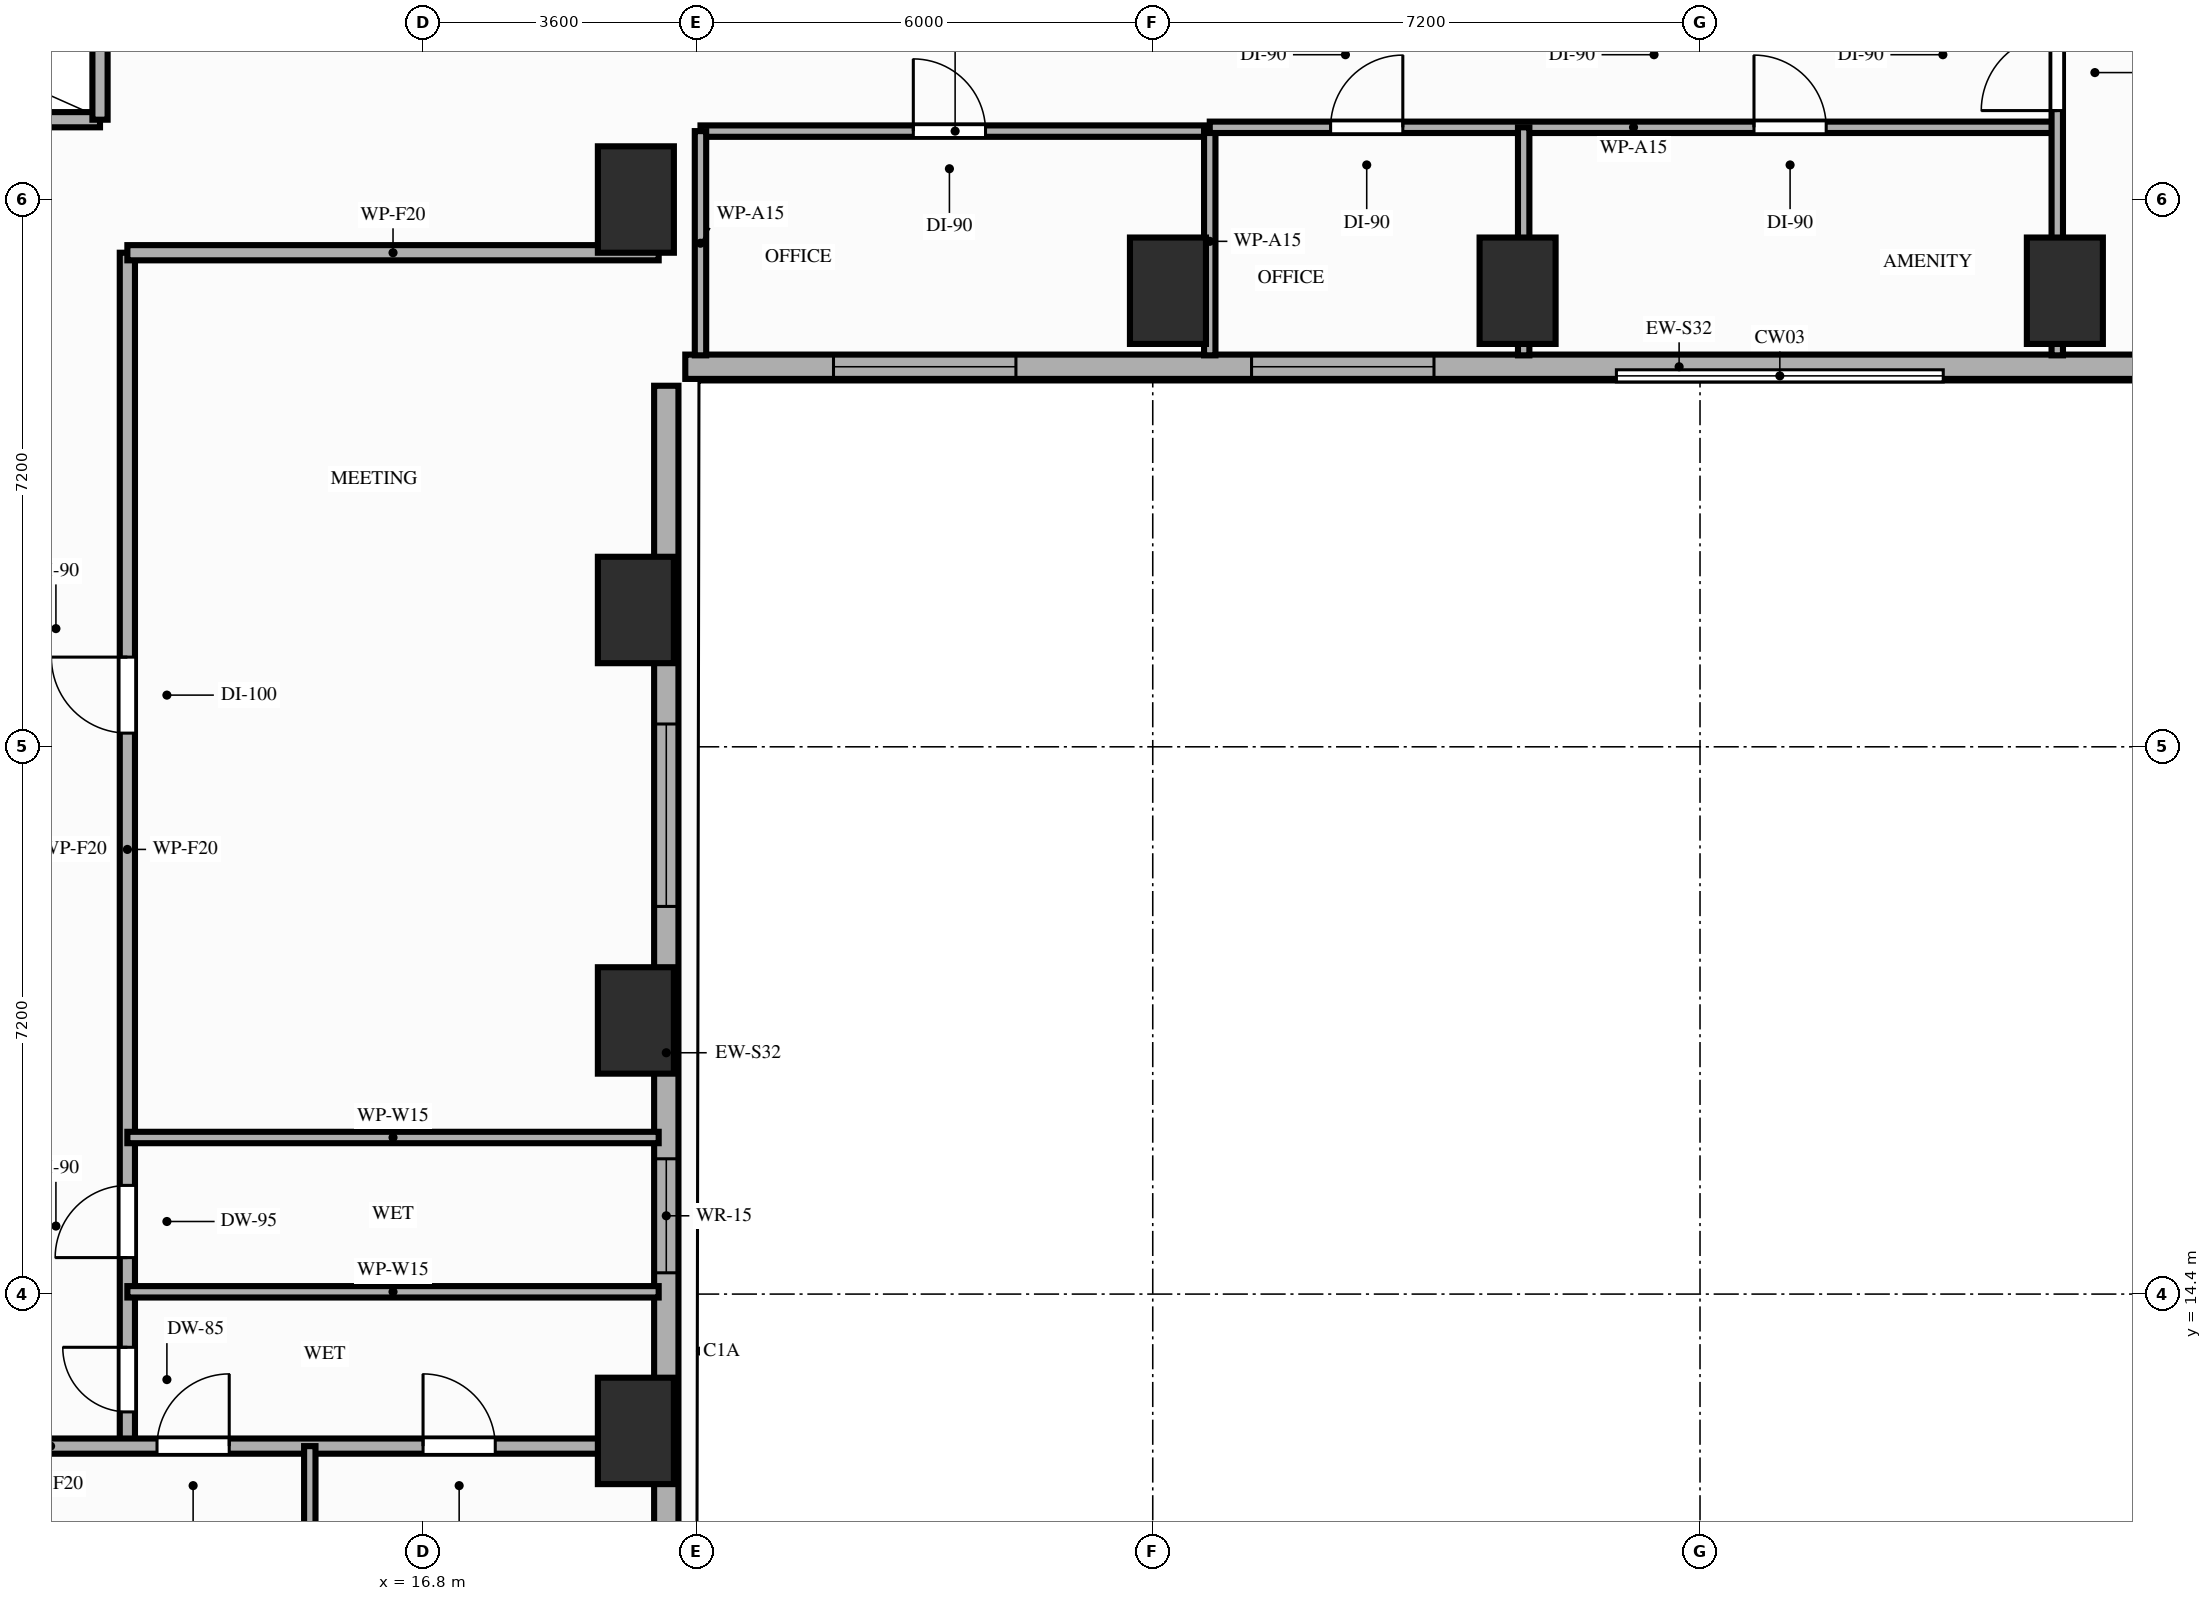
"""IFC4 building model, lengths in metres.
Left out: names, types, materials, properties, quantities, classifications, styles, units other than length and angle.
Written with IfcOpenShell. Run it as: python <this file> out.ifc"""

import sys

from ifc_helpers import new_model, si_unit, direction, frame, frame_2d, origin, origin_2d, place, context, subcontext, project, spatial, rectangle, extrude, element, fill, save


model = new_model("IFC4")
c1 = context("Model", 3, precision=1e-05, world=origin(), true_north=direction((0.0, 1.0)))
c2 = subcontext(c1, "Body", "Model", "MODEL_VIEW")
j1 = project(units=[si_unit("LENGTHUNIT", "METRE"), si_unit("PLANEANGLEUNIT", "RADIAN")], contexts=[c1])
p1 = place(None, origin())
s1 = spatial("IfcSite", under=j1, at=p1, CompositionType="ELEMENT")
p2 = place(p1, origin())
s2 = spatial("IfcBuilding", under=s1, at=p2, CompositionType="ELEMENT")
p3 = place(p2, frame((0.0, 0.0, 66.0)))
s3 = spatial("IfcBuildingStorey", under=s2, at=p3, CompositionType="ELEMENT", Elevation=66.0)
for number, where, z_axis, x_axis in (
    (1, (19.6, 12.6, 0.0), (0.0, 0.0, 1.0), (1.0, 0.0, 0.0)),
    (2, (19.6, 18.0, 0.0), (0.0, 0.0, 1.0), (1.0, 0.0, 0.0)),
    (3, (19.6, 23.4, 0.0), (0.0, 0.0, 1.0), (1.0, 0.0, 0.0)),
    (4, (19.6, 28.8, 0.0), (0.0, 0.0, 1.0), (1.0, 0.0, 0.0)),
    (5, (26.6, 27.6, 0.0), (0.0, 0.0, 1.0), (1.0, 0.0, 0.0)),
    (6, (31.2, 27.6, 0.0), (0.0, 0.0, 1.0), (1.0, 0.0, 0.0)),
    (7, (38.4, 27.6, 0.0), (0.0, 0.0, 1.0), (1.0, 0.0, 0.0)),
):
    element("IfcColumn", number, at=place(p3, frame(where, z_axis=z_axis, x_axis=x_axis)), inside=s3, PredefinedType="COLUMN", context=c2, shape_type="SweptSolid", body=[
        extrude(rectangle(XDim=1.0, YDim=1.4, at=origin_2d()), origin(), (0.0, 0.0, 1.0), 3.2),
    ])
p4 = place(p3, frame((20.0, 8.8, 0.0), z_axis=(0.0, 0.0, 1.0), x_axis=(0.0, 1.0, 0.0)))
e8 = element("IfcWall", 8, at=p4, inside=s3, PredefinedType="STANDARD", context=c2, shape_type="SweptSolid", body=[
    extrude(rectangle(XDim=17.55, YDim=0.32, at=frame_2d((8.775, 0.0))), origin(), (0.0, 0.0, 1.0), 2.41),
])
p5 = place(p4, frame((5.88, 0.0, 0.85)))
e9 = element("IfcOpeningElement", 9, at=p5, cuts=e8, PredefinedType="OPENING", context=c2, shape_type="SweptSolid", body=[
    extrude(rectangle(XDim=1.5, YDim=1.31, at=frame_2d((0.75, 0.655))), frame((0.0, 0.17, 0.0), z_axis=(0.0, -1.0, 0.0), x_axis=(1.0, 0.0, 0.0)), (0.0, 0.0, 1.0), 0.34),
])
p6 = place(p4, frame((10.7, 0.0, 0.85)))
e10 = element("IfcOpeningElement", 10, at=p6, cuts=e8, PredefinedType="OPENING", context=c2, shape_type="SweptSolid", body=[
    extrude(rectangle(XDim=2.4, YDim=1.31, at=frame_2d((1.2, 0.655))), frame((0.0, 0.17, 0.0), z_axis=(0.0, -1.0, 0.0), x_axis=(1.0, 0.0, 0.0)), (0.0, 0.0, 1.0), 0.34),
])
p7 = place(p3, frame((20.25, 26.6, 0.0), z_axis=(0.0, 0.0, 1.0), x_axis=(1.0, 0.0, 0.0)))
e11 = element("IfcWall", 11, at=p7, inside=s3, PredefinedType="STANDARD", context=c2, shape_type="SweptSolid", body=[
    extrude(rectangle(XDim=26.15, YDim=0.32, at=frame_2d((13.075, 0.0))), origin(), (0.0, 0.0, 1.0), 2.7),
])
p8 = place(p7, frame((1.95, 0.0, 0.85)))
e12 = element("IfcOpeningElement", 12, at=p8, cuts=e11, PredefinedType="OPENING", context=c2, shape_type="SweptSolid", body=[
    extrude(rectangle(XDim=2.4, YDim=1.6, at=frame_2d((1.2, 0.8))), frame((0.0, 0.17, 0.0), z_axis=(0.0, -1.0, 0.0), x_axis=(1.0, 0.0, 0.0)), (0.0, 0.0, 1.0), 0.34),
])
p9 = place(p7, frame((7.45, 0.0, 0.85)))
e13 = element("IfcOpeningElement", 13, at=p9, cuts=e11, PredefinedType="OPENING", context=c2, shape_type="SweptSolid", body=[
    extrude(rectangle(XDim=2.4, YDim=1.6, at=frame_2d((1.2, 0.8))), frame((0.0, 0.17, 0.0), z_axis=(0.0, -1.0, 0.0), x_axis=(1.0, 0.0, 0.0)), (0.0, 0.0, 1.0), 0.34),
])
p10 = place(p7, frame((21.95, 0.0, 0.85)))
e14 = element("IfcOpeningElement", 14, at=p10, cuts=e11, PredefinedType="OPENING", context=c2, shape_type="SweptSolid", body=[
    extrude(rectangle(XDim=2.4, YDim=1.6, at=frame_2d((1.2, 0.8))), frame((0.0, 0.17, 0.0), z_axis=(0.0, -1.0, 0.0), x_axis=(1.0, 0.0, 0.0)), (0.0, 0.0, 1.0), 0.34),
])
p11 = place(p3, frame((7.0, 29.85, 0.0), z_axis=(0.0, 0.0, 1.0), x_axis=(1.0, 0.0, 0.0)))
e15 = element("IfcWall", 15, at=p11, inside=s3, PredefinedType="MOVABLE", context=c2, shape_type="SweptSolid", body=[
    extrude(rectangle(XDim=5.55, YDim=0.2, at=frame_2d((2.775, 0.0))), origin(), (0.0, 0.0, 1.0), 3.02),
])
p12 = place(p3, frame((12.55, 29.85, 0.0), z_axis=(0.0, 0.0, 1.0), x_axis=(0.0, 1.0, 0.0)))
e16 = element("IfcWall", 16, at=p12, inside=s3, PredefinedType="MOVABLE", context=c2, shape_type="SweptSolid", body=[
    extrude(rectangle(XDim=2.5, YDim=0.2, at=frame_2d((1.25, 0.0))), origin(), (0.0, 0.0, 1.0), 3.02),
])
p13 = place(p3, frame((12.91, 12.4, 0.0), z_axis=(0.0, 0.0, 1.0), x_axis=(0.0, 1.0, 0.0)))
e17 = element("IfcWall", 17, at=p13, inside=s3, PredefinedType="PARTITIONING", context=c2, shape_type="SweptSolid", body=[
    extrude(rectangle(XDim=15.7, YDim=0.2, at=frame_2d((7.85, 0.0))), origin(), (0.0, 0.0, 1.0), 2.41),
])
p14 = place(p13, frame((0.45, 0.0, 0.0)))
e18 = element("IfcOpeningElement", 18, at=p14, cuts=e17, PredefinedType="OPENING", context=c2, shape_type="SweptSolid", body=[
    extrude(rectangle(XDim=0.85, YDim=2.1, at=frame_2d((0.425, 1.05))), frame((0.0, 0.11, 0.0), z_axis=(0.0, -1.0, 0.0), x_axis=(1.0, 0.0, 0.0)), (0.0, 0.0, 1.0), 0.22),
])
p15 = place(p13, frame((2.48, 0.0, 0.0)))
e19 = element("IfcOpeningElement", 19, at=p15, cuts=e17, PredefinedType="OPENING", context=c2, shape_type="SweptSolid", body=[
    extrude(rectangle(XDim=0.95, YDim=2.1, at=frame_2d((0.475, 1.05))), frame((0.0, 0.11, 0.0), z_axis=(0.0, -1.0, 0.0), x_axis=(1.0, 0.0, 0.0)), (0.0, 0.0, 1.0), 0.22),
])
p16 = place(p13, frame((9.38, 0.0, 0.0)))
e20 = element("IfcOpeningElement", 20, at=p16, cuts=e17, PredefinedType="OPENING", context=c2, shape_type="SweptSolid", body=[
    extrude(rectangle(XDim=1.0, YDim=2.15, at=frame_2d((0.5, 1.075))), frame((0.0, 0.11, 0.0), z_axis=(0.0, -1.0, 0.0), x_axis=(1.0, 0.0, 0.0)), (0.0, 0.0, 1.0), 0.22),
])
p17 = place(p3, frame((3.9, 12.4, 0.0), z_axis=(0.0, 0.0, 1.0), x_axis=(1.0, 0.0, 0.0)))
e21 = element("IfcWall", 21, at=p17, inside=s3, PredefinedType="PARTITIONING", context=c2, shape_type="SweptSolid", body=[
    extrude(rectangle(XDim=16.0, YDim=0.2, at=frame_2d((8.0, 0.0))), origin(), (0.0, 0.0, 1.0), 2.41),
])
p18 = place(p17, frame((9.4, 0.0, 0.0)))
e22 = element("IfcOpeningElement", 22, at=p18, cuts=e21, PredefinedType="OPENING", context=c2, shape_type="SweptSolid", body=[
    extrude(rectangle(XDim=0.95, YDim=2.15, at=frame_2d((0.475, 1.075))), frame((0.0, 0.11, 0.0), z_axis=(0.0, -1.0, 0.0), x_axis=(1.0, 0.0, 0.0)), (0.0, 0.0, 1.0), 0.22),
])
p19 = place(p17, frame((12.9, 0.0, 0.0)))
e23 = element("IfcOpeningElement", 23, at=p19, cuts=e21, PredefinedType="OPENING", context=c2, shape_type="SweptSolid", body=[
    extrude(rectangle(XDim=0.95, YDim=2.15, at=frame_2d((0.475, 1.075))), frame((0.0, 0.11, 0.0), z_axis=(0.0, -1.0, 0.0), x_axis=(1.0, 0.0, 0.0)), (0.0, 0.0, 1.0), 0.22),
])
p20 = place(p3, frame((12.91, 28.1, 0.0), z_axis=(0.0, 0.0, 1.0), x_axis=(1.0, 0.0, 0.0)))
e24 = element("IfcWall", 24, at=p20, inside=s3, PredefinedType="PARTITIONING", context=c2, shape_type="SweptSolid", body=[
    extrude(rectangle(XDim=6.99, YDim=0.2, at=frame_2d((3.495, 0.0))), origin(), (0.0, 0.0, 1.0), 2.41),
])
p21 = place(p3, frame((20.45, 29.7, 0.0), z_axis=(0.0, 0.0, 1.0), x_axis=(1.0, 0.0, 0.0)))
e25 = element("IfcWall", 25, at=p21, inside=s3, PredefinedType="PARTITIONING", context=c2, shape_type="SweptSolid", body=[
    extrude(rectangle(XDim=6.7, YDim=0.15, at=frame_2d((3.35, 0.0))), origin(), (0.0, 0.0, 1.0), 3.02),
])
p22 = place(p21, frame((2.8, 0.0, 0.0)))
e26 = element("IfcOpeningElement", 26, at=p22, cuts=e25, PredefinedType="OPENING", context=c2, shape_type="SweptSolid", body=[
    extrude(rectangle(XDim=0.95, YDim=2.15, at=frame_2d((0.475, 1.075))), frame((0.0, 0.085, 0.0), z_axis=(0.0, -1.0, 0.0), x_axis=(1.0, 0.0, 0.0)), (0.0, 0.0, 1.0), 0.17),
])
p23 = place(p3, frame((20.45, 26.75, 0.0), z_axis=(0.0, 0.0, 1.0), x_axis=(0.0, 1.0, 0.0)))
e27 = element("IfcWall", 27, at=p23, inside=s3, PredefinedType="PARTITIONING", context=c2, shape_type="SweptSolid", body=[
    extrude(rectangle(XDim=2.95, YDim=0.15, at=frame_2d((1.475, 0.0))), origin(), (0.0, 0.0, 1.0), 2.41),
])
p24 = place(p3, frame((27.15, 26.75, 0.0), z_axis=(0.0, 0.0, 1.0), x_axis=(0.0, 1.0, 0.0)))
e28 = element("IfcWall", 28, at=p24, inside=s3, PredefinedType="PARTITIONING", context=c2, shape_type="SweptSolid", body=[
    extrude(rectangle(XDim=3.0, YDim=0.15, at=frame_2d((1.5, 0.0))), origin(), (0.0, 0.0, 1.0), 2.41),
])
p25 = place(p3, frame((15.31, 8.7, 0.0), z_axis=(0.0, 0.0, 1.0), x_axis=(0.0, 1.0, 0.0)))
e29 = element("IfcWall", 29, at=p25, inside=s3, PredefinedType="PARTITIONING", context=c2, shape_type="SweptSolid", body=[
    extrude(rectangle(XDim=3.7, YDim=0.15, at=frame_2d((1.85, 0.0))), origin(), (0.0, 0.0, 1.0), 2.41),
])
for number, where, z_axis, x_axis in (
    (30, (12.91, 14.43, 0.0), (0.0, 0.0, 1.0), (1.0, 0.0, 0.0)),
    (31, (12.91, 16.46, 0.0), (0.0, 0.0, 1.0), (1.0, 0.0, 0.0)),
):
    element("IfcWall", number, at=place(p3, frame(where, z_axis=z_axis, x_axis=x_axis)), inside=s3, PredefinedType="PARTITIONING", context=c2, shape_type="SweptSolid", body=[
        extrude(rectangle(XDim=6.99, YDim=0.15, at=frame_2d((3.495, 0.0))), origin(), (0.0, 0.0, 1.0), 2.41),
    ])
p26 = place(p3, frame((27.15, 29.75, 0.0), z_axis=(0.0, 0.0, 1.0), x_axis=(1.0, 0.0, 0.0)))
e32 = element("IfcWall", 32, at=p26, inside=s3, PredefinedType="PARTITIONING", context=c2, shape_type="SweptSolid", body=[
    extrude(rectangle(XDim=11.15, YDim=0.15, at=frame_2d((5.575, 0.0))), origin(), (0.0, 0.0, 1.0), 2.41),
])
p27 = place(p26, frame((1.59, 0.0, 0.0)))
e33 = element("IfcOpeningElement", 33, at=p27, cuts=e32, PredefinedType="OPENING", context=c2, shape_type="SweptSolid", body=[
    extrude(rectangle(XDim=0.95, YDim=2.15, at=frame_2d((0.475, 1.075))), frame((0.0, 0.085, 0.0), z_axis=(0.0, -1.0, 0.0), x_axis=(1.0, 0.0, 0.0)), (0.0, 0.0, 1.0), 0.17),
])
p28 = place(p26, frame((7.16, 0.0, 0.0)))
e34 = element("IfcOpeningElement", 34, at=p28, cuts=e32, PredefinedType="OPENING", context=c2, shape_type="SweptSolid", body=[
    extrude(rectangle(XDim=0.95, YDim=2.15, at=frame_2d((0.475, 1.075))), frame((0.0, 0.085, 0.0), z_axis=(0.0, -1.0, 0.0), x_axis=(1.0, 0.0, 0.0)), (0.0, 0.0, 1.0), 0.17),
])
p29 = place(p3, frame((38.3, 26.75, 0.0), z_axis=(0.0, 0.0, 1.0), x_axis=(0.0, 1.0, 0.0)))
e35 = element("IfcWall", 35, at=p29, inside=s3, PredefinedType="PARTITIONING", context=c2, shape_type="SweptSolid", body=[
    extrude(rectangle(XDim=15.45, YDim=0.15, at=frame_2d((7.725, 0.0))), origin(), (0.0, 0.0, 1.0), 2.41),
])
p30 = place(p29, frame((3.22, 0.0, 0.0)))
e36 = element("IfcOpeningElement", 36, at=p30, cuts=e35, PredefinedType="OPENING", context=c2, shape_type="SweptSolid", body=[
    extrude(rectangle(XDim=1.0, YDim=2.15, at=frame_2d((0.5, 1.075))), frame((0.0, 0.085, 0.0), z_axis=(0.0, -1.0, 0.0), x_axis=(1.0, 0.0, 0.0)), (0.0, 0.0, 1.0), 0.17),
])
p31 = place(p3, frame((31.28, 26.75, 0.0), z_axis=(0.0, 0.0, 1.0), x_axis=(0.0, 1.0, 0.0)))
e37 = element("IfcWall", 37, at=p31, inside=s3, PredefinedType="PARTITIONING", context=c2, shape_type="SweptSolid", body=[
    extrude(rectangle(XDim=3.0, YDim=0.15, at=frame_2d((1.5, 0.0))), origin(), (0.0, 0.0, 1.0), 2.41),
])
p32 = place(p5, origin())
e38 = element("IfcWindow", 38, at=p32, inside=s3, PartitioningType="SINGLE_PANEL", PredefinedType="WINDOW", context=c2, shape_type="SweptSolid", body=[
    extrude(rectangle(XDim=1.5, YDim=1.31, at=frame_2d((0.75, 0.655))), frame((0.0, 0.03, 0.0), z_axis=(0.0, -1.0, 0.0), x_axis=(1.0, 0.0, 0.0)), (0.0, 0.0, 1.0), 0.06),
])
fill(e9, e38)
p33 = place(p6, origin())
e39 = element("IfcWindow", 39, at=p33, inside=s3, PartitioningType="SINGLE_PANEL", PredefinedType="WINDOW", context=c2, shape_type="SweptSolid", body=[
    extrude(rectangle(XDim=2.4, YDim=1.31, at=frame_2d((1.2, 0.655))), frame((0.0, 0.03, 0.0), z_axis=(0.0, -1.0, 0.0), x_axis=(1.0, 0.0, 0.0)), (0.0, 0.0, 1.0), 0.06),
])
fill(e10, e39)
p34 = place(p8, origin())
e40 = element("IfcWindow", 40, at=p34, inside=s3, PartitioningType="SINGLE_PANEL", PredefinedType="WINDOW", context=c2, shape_type="SweptSolid", body=[
    extrude(rectangle(XDim=2.4, YDim=1.6, at=frame_2d((1.2, 0.8))), frame((0.0, 0.03, 0.0), z_axis=(0.0, -1.0, 0.0), x_axis=(1.0, 0.0, 0.0)), (0.0, 0.0, 1.0), 0.06),
])
fill(e12, e40)
p35 = place(p9, origin())
e41 = element("IfcWindow", 41, at=p35, inside=s3, PartitioningType="SINGLE_PANEL", PredefinedType="WINDOW", context=c2, shape_type="SweptSolid", body=[
    extrude(rectangle(XDim=2.4, YDim=1.6, at=frame_2d((1.2, 0.8))), frame((0.0, 0.03, 0.0), z_axis=(0.0, -1.0, 0.0), x_axis=(1.0, 0.0, 0.0)), (0.0, 0.0, 1.0), 0.06),
])
fill(e13, e41)
p36 = place(p22, origin())
e42 = element("IfcDoor", 42, at=p36, inside=s3, OperationType="SINGLE_SWING_LEFT", PredefinedType="DOOR", context=c2, shape_type="SweptSolid", body=[
    extrude(rectangle(XDim=0.95, YDim=2.15, at=frame_2d((0.475, 1.075))), frame((0.0, 0.025, 0.0), z_axis=(0.0, -1.0, 0.0), x_axis=(1.0, 0.0, 0.0)), (0.0, 0.0, 1.0), 0.05),
])
fill(e26, e42)
p37 = place(p18, origin())
e43 = element("IfcDoor", 43, at=p37, inside=s3, OperationType="SINGLE_SWING_RIGHT", PredefinedType="DOOR", context=c2, shape_type="SweptSolid", body=[
    extrude(rectangle(XDim=0.95, YDim=2.15, at=frame_2d((0.475, 1.075))), frame((0.0, 0.025, 0.0), z_axis=(0.0, -1.0, 0.0), x_axis=(1.0, 0.0, 0.0)), (0.0, 0.0, 1.0), 0.05),
])
fill(e22, e43)
p38 = place(p19, origin())
e44 = element("IfcDoor", 44, at=p38, inside=s3, OperationType="SINGLE_SWING_LEFT", PredefinedType="DOOR", context=c2, shape_type="SweptSolid", body=[
    extrude(rectangle(XDim=0.95, YDim=2.15, at=frame_2d((0.475, 1.075))), frame((0.0, 0.025, 0.0), z_axis=(0.0, -1.0, 0.0), x_axis=(1.0, 0.0, 0.0)), (0.0, 0.0, 1.0), 0.05),
])
fill(e23, e44)
p39 = place(p14, origin())
e45 = element("IfcDoor", 45, at=p39, inside=s3, OperationType="SINGLE_SWING_RIGHT", PredefinedType="DOOR", context=c2, shape_type="SweptSolid", body=[
    extrude(rectangle(XDim=0.85, YDim=2.1, at=frame_2d((0.425, 1.05))), frame((0.0, 0.025, 0.0), z_axis=(0.0, -1.0, 0.0), x_axis=(1.0, 0.0, 0.0)), (0.0, 0.0, 1.0), 0.05),
])
fill(e18, e45)
p40 = place(p15, origin())
e46 = element("IfcDoor", 46, at=p40, inside=s3, OperationType="SINGLE_SWING_LEFT", PredefinedType="DOOR", context=c2, shape_type="SweptSolid", body=[
    extrude(rectangle(XDim=0.95, YDim=2.1, at=frame_2d((0.475, 1.05))), frame((0.0, 0.025, 0.0), z_axis=(0.0, -1.0, 0.0), x_axis=(1.0, 0.0, 0.0)), (0.0, 0.0, 1.0), 0.05),
])
fill(e19, e46)
p41 = place(p16, origin())
e47 = element("IfcDoor", 47, at=p41, inside=s3, OperationType="SINGLE_SWING_RIGHT", PredefinedType="DOOR", context=c2, shape_type="SweptSolid", body=[
    extrude(rectangle(XDim=1.0, YDim=2.15, at=frame_2d((0.5, 1.075))), frame((0.0, 0.025, 0.0), z_axis=(0.0, -1.0, 0.0), x_axis=(1.0, 0.0, 0.0)), (0.0, 0.0, 1.0), 0.05),
])
fill(e20, e47)
p42 = place(p30, origin())
e48 = element("IfcDoor", 48, at=p42, inside=s3, OperationType="SINGLE_SWING_LEFT", PredefinedType="DOOR", context=c2, shape_type="SweptSolid", body=[
    extrude(rectangle(XDim=1.0, YDim=2.15, at=frame_2d((0.5, 1.075))), frame((0.0, 0.025, 0.0), z_axis=(0.0, -1.0, 0.0), x_axis=(1.0, 0.0, 0.0)), (0.0, 0.0, 1.0), 0.05),
])
fill(e36, e48)
p43 = place(p27, origin())
e49 = element("IfcDoor", 49, at=p43, inside=s3, OperationType="SINGLE_SWING_RIGHT", PredefinedType="DOOR", context=c2, shape_type="SweptSolid", body=[
    extrude(rectangle(XDim=0.95, YDim=2.15, at=frame_2d((0.475, 1.075))), frame((0.0, 0.025, 0.0), z_axis=(0.0, -1.0, 0.0), x_axis=(1.0, 0.0, 0.0)), (0.0, 0.0, 1.0), 0.05),
])
fill(e33, e49)
p44 = place(p28, origin())
e50 = element("IfcDoor", 50, at=p44, inside=s3, OperationType="SINGLE_SWING_LEFT", PredefinedType="DOOR", context=c2, shape_type="SweptSolid", body=[
    extrude(rectangle(XDim=0.95, YDim=2.15, at=frame_2d((0.475, 1.075))), frame((0.0, 0.025, 0.0), z_axis=(0.0, -1.0, 0.0), x_axis=(1.0, 0.0, 0.0)), (0.0, 0.0, 1.0), 0.05),
])
fill(e34, e50)
save(model, sys.argv[1])
